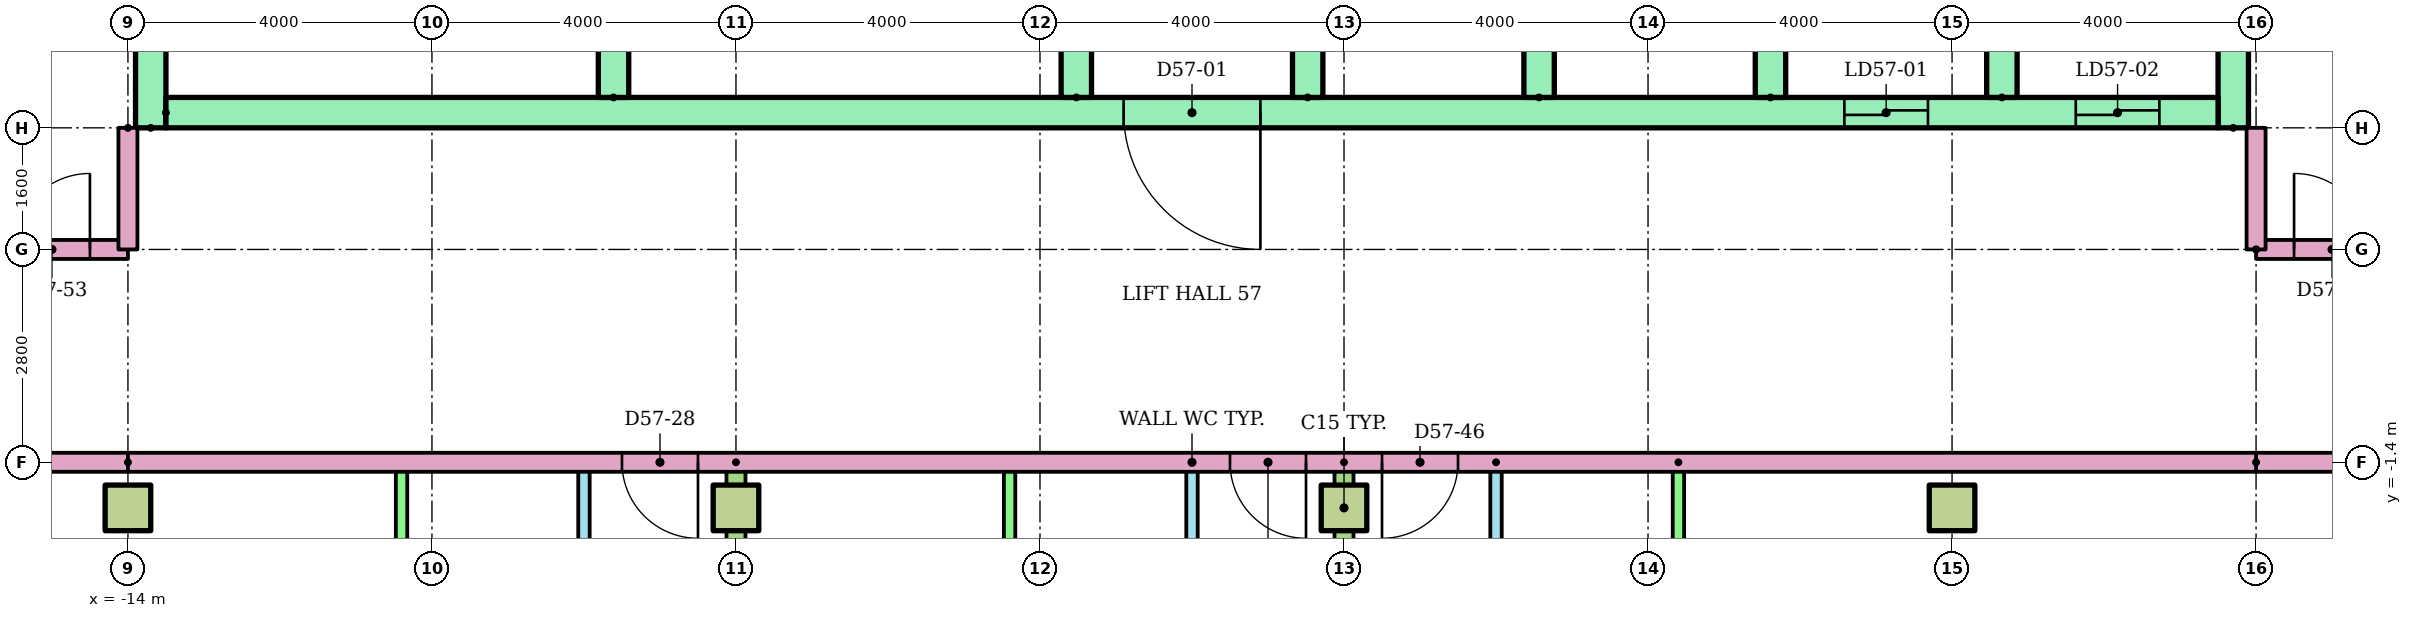
"""IFC4 building model, lengths in metres.
Left out: names, types, materials, properties, quantities, classifications, styles, units other than length and angle.
Written with IfcOpenShell. Run it as: python <this file> out.ifc"""

import sys

from ifc_helpers import new_model, si_unit, direction, frame, frame_2d, origin, origin_2d, place, context, subcontext, project, spatial, rectangle, extrude, element, fill, save


model = new_model("IFC4")
c1 = context("Model", 3, precision=1e-05, world=origin(), true_north=direction((0.0, 1.0)))
c2 = subcontext(c1, "Body", "Model", "MODEL_VIEW")
j1 = project(units=[si_unit("LENGTHUNIT", "METRE"), si_unit("PLANEANGLEUNIT", "RADIAN")], contexts=[c1])
p1 = place(None, origin())
s1 = spatial("IfcSite", under=j1, at=p1, CompositionType="ELEMENT")
p2 = place(p1, origin())
s2 = spatial("IfcBuilding", under=s1, at=p2, CompositionType="ELEMENT")
p3 = place(p2, frame((0.0, 0.0, 220.4)))
s3 = spatial("IfcBuildingStorey", under=s2, at=p3, CompositionType="ELEMENT", Elevation=220.4)
for number, where in (
    (1, (-14.0, -2.0, 0.0)),
    (2, (-6.0, -2.0, 0.0)),
    (3, (2.0, -2.0, 0.0)),
    (4, (10.0, -2.0, 0.0)),
):
    element("IfcColumn", number, at=place(p3, frame(where)), inside=s3, PredefinedType="COLUMN", context=c2, shape_type="SweptSolid", body=[
        extrude(rectangle(XDim=0.6, YDim=0.6, at=origin_2d()), origin(), (0.0, 0.0, 1.0), 3.2),
    ])
for number, where, z_axis, x_axis in (
    (5, (-13.7, 3.0, 0.0), (0.0, 0.0, 1.0), (0.0, 1.0, 0.0)),
    (6, (13.7, 3.0, 0.0), (0.0, 0.0, 1.0), (0.0, 1.0, 0.0)),
):
    element("IfcWall", number, at=place(p3, frame(where, z_axis=z_axis, x_axis=x_axis)), inside=s3, PredefinedType="SHEAR", context=c2, shape_type="SweptSolid", body=[
        extrude(rectangle(XDim=17.0, YDim=0.4, at=frame_2d((8.5, 0.0))), origin(), (0.0, 0.0, 1.0), 2.92),
    ])
p4 = place(p3, frame((-13.5, 3.2, 0.0)))
e7 = element("IfcWall", 7, at=p4, inside=s3, PredefinedType="SHEAR", context=c2, shape_type="SweptSolid", body=[
    extrude(rectangle(XDim=27.0, YDim=0.4, at=frame_2d((13.5, 0.0))), origin(), (0.0, 0.0, 1.0), 2.92),
])
p5 = place(p4, frame((22.083, 0.0, 0.0)))
e8 = element("IfcOpeningElement", 8, at=p5, cuts=e7, PredefinedType="OPENING", context=c2, shape_type="SweptSolid", body=[
    extrude(rectangle(XDim=1.1, YDim=2.1, at=frame_2d((0.55, 1.05))), frame((0.0, 0.21, 0.0), z_axis=(0.0, -1.0, 0.0), x_axis=(1.0, 0.0, 0.0)), (0.0, 0.0, 1.0), 0.42),
])
p6 = place(p4, frame((25.128, 0.0, 0.0)))
e9 = element("IfcOpeningElement", 9, at=p6, cuts=e7, PredefinedType="OPENING", context=c2, shape_type="SweptSolid", body=[
    extrude(rectangle(XDim=1.1, YDim=2.1, at=frame_2d((0.55, 1.05))), frame((0.0, 0.21, 0.0), z_axis=(0.0, -1.0, 0.0), x_axis=(1.0, 0.0, 0.0)), (0.0, 0.0, 1.0), 0.42),
])
p7 = place(p4, frame((12.6, 0.0, 0.0)))
e10 = element("IfcOpeningElement", 10, at=p7, cuts=e7, PredefinedType="OPENING", context=c2, shape_type="SweptSolid", body=[
    extrude(rectangle(XDim=1.8, YDim=2.1, at=frame_2d((0.9, 1.05))), frame((0.0, 0.21, 0.0), z_axis=(0.0, -1.0, 0.0), x_axis=(1.0, 0.0, 0.0)), (0.0, 0.0, 1.0), 0.42),
])
for number, where, z_axis, x_axis in (
    (11, (-7.611, 3.4, 0.0), (0.0, 0.0, 1.0), (0.0, 1.0, 0.0)),
    (12, (-1.522, 3.4, 0.0), (0.0, 0.0, 1.0), (0.0, 1.0, 0.0)),
    (13, (1.522, 3.4, 0.0), (0.0, 0.0, 1.0), (0.0, 1.0, 0.0)),
    (14, (4.567, 3.4, 0.0), (0.0, 0.0, 1.0), (0.0, 1.0, 0.0)),
    (15, (7.611, 3.4, 0.0), (0.0, 0.0, 1.0), (0.0, 1.0, 0.0)),
    (16, (10.656, 3.4, 0.0), (0.0, 0.0, 1.0), (0.0, 1.0, 0.0)),
):
    element("IfcWall", number, at=place(p3, frame(where, z_axis=z_axis, x_axis=x_axis)), inside=s3, PredefinedType="SHEAR", context=c2, shape_type="SweptSolid", body=[
        extrude(rectangle(XDim=3.0, YDim=0.4, at=frame_2d((1.5, 0.0))), origin(), (0.0, 0.0, 1.0), 2.92),
    ])
p8 = place(p3, frame((-8.0, -9.4, 0.0), z_axis=(0.0, 0.0, 1.0), x_axis=(0.0, 1.0, 0.0)))
e17 = element("IfcWall", 17, at=p8, inside=s3, PredefinedType="PARTITIONING", context=c2, shape_type="SweptSolid", body=[
    extrude(rectangle(XDim=8.0, YDim=0.15, at=frame_2d((4.0, 0.0))), origin(), (0.0, 0.0, 1.0), 2.4),
])
p9 = place(p8, frame((5.3, 0.0, 0.0)))
e18 = element("IfcOpeningElement", 18, at=p9, cuts=e17, PredefinedType="OPENING", context=c2, shape_type="SweptSolid", body=[
    extrude(rectangle(XDim=0.9, YDim=2.1, at=frame_2d((0.45, 1.05))), frame((0.0, 0.085, 0.0), z_axis=(0.0, -1.0, 0.0), x_axis=(1.0, 0.0, 0.0)), (0.0, 0.0, 1.0), 0.17),
])
p10 = place(p8, frame((1.35, 0.0, 0.0)))
e19 = element("IfcOpeningElement", 19, at=p10, cuts=e17, PredefinedType="OPENING", context=c2, shape_type="SweptSolid", body=[
    extrude(rectangle(XDim=0.8, YDim=2.1, at=frame_2d((0.4, 1.05))), frame((0.0, 0.085, 0.0), z_axis=(0.0, -1.0, 0.0), x_axis=(1.0, 0.0, 0.0)), (0.0, 0.0, 1.0), 0.17),
])
p11 = place(p3, frame((-10.4, -9.4, 0.0), z_axis=(0.0, 0.0, 1.0), x_axis=(0.0, 1.0, 0.0)))
e20 = element("IfcWall", 20, at=p11, inside=s3, PredefinedType="PARTITIONING", context=c2, shape_type="SweptSolid", body=[
    extrude(rectangle(XDim=8.0, YDim=0.15, at=frame_2d((4.0, 0.0))), origin(), (0.0, 0.0, 1.0), 2.4),
])
p12 = place(p3, frame((0.0, -9.4, 0.0), z_axis=(0.0, 0.0, 1.0), x_axis=(0.0, 1.0, 0.0)))
e21 = element("IfcWall", 21, at=p12, inside=s3, PredefinedType="PARTITIONING", context=c2, shape_type="SweptSolid", body=[
    extrude(rectangle(XDim=8.0, YDim=0.15, at=frame_2d((4.0, 0.0))), origin(), (0.0, 0.0, 1.0), 2.4),
])
p13 = place(p12, frame((5.3, 0.0, 0.0)))
e22 = element("IfcOpeningElement", 22, at=p13, cuts=e21, PredefinedType="OPENING", context=c2, shape_type="SweptSolid", body=[
    extrude(rectangle(XDim=0.9, YDim=2.1, at=frame_2d((0.45, 1.05))), frame((0.0, 0.085, 0.0), z_axis=(0.0, -1.0, 0.0), x_axis=(1.0, 0.0, 0.0)), (0.0, 0.0, 1.0), 0.17),
])
p14 = place(p12, frame((1.35, 0.0, 0.0)))
e23 = element("IfcOpeningElement", 23, at=p14, cuts=e21, PredefinedType="OPENING", context=c2, shape_type="SweptSolid", body=[
    extrude(rectangle(XDim=0.8, YDim=2.1, at=frame_2d((0.4, 1.05))), frame((0.0, 0.085, 0.0), z_axis=(0.0, -1.0, 0.0), x_axis=(1.0, 0.0, 0.0)), (0.0, 0.0, 1.0), 0.17),
])
p15 = place(p3, frame((-2.4, -9.4, 0.0), z_axis=(0.0, 0.0, 1.0), x_axis=(0.0, 1.0, 0.0)))
e24 = element("IfcWall", 24, at=p15, inside=s3, PredefinedType="PARTITIONING", context=c2, shape_type="SweptSolid", body=[
    extrude(rectangle(XDim=8.0, YDim=0.15, at=frame_2d((4.0, 0.0))), origin(), (0.0, 0.0, 1.0), 2.4),
])
p16 = place(p3, frame((-6.0, -1.4, 0.0), z_axis=(0.0, 0.0, 1.0), x_axis=(0.0, -1.0, 0.0)))
e25 = element("IfcWall", 25, at=p16, inside=s3, PredefinedType="PARTITIONING", context=c2, shape_type="SweptSolid", body=[
    extrude(rectangle(XDim=15.11, YDim=0.25, at=frame_2d((7.555, 0.0))), origin(), (0.0, 0.0, 1.0), 2.4),
])
p17 = place(p3, frame((4.0, -1.4, 0.0), z_axis=(0.0, 0.0, 1.0), x_axis=(0.0, -1.0, 0.0)))
e26 = element("IfcWall", 26, at=p17, inside=s3, PredefinedType="PARTITIONING", context=c2, shape_type="SweptSolid", body=[
    extrude(rectangle(XDim=8.0, YDim=0.15, at=frame_2d((4.0, 0.0))), origin(), (0.0, 0.0, 1.0), 2.4),
])
p18 = place(p17, frame((1.8, 0.0, 0.0)))
e27 = element("IfcOpeningElement", 27, at=p18, cuts=e26, PredefinedType="OPENING", context=c2, shape_type="SweptSolid", body=[
    extrude(rectangle(XDim=0.9, YDim=2.1, at=frame_2d((0.45, 1.05))), frame((0.0, 0.085, 0.0), z_axis=(0.0, -1.0, 0.0), x_axis=(1.0, 0.0, 0.0)), (0.0, 0.0, 1.0), 0.17),
])
p19 = place(p17, frame((5.85, 0.0, 0.0)))
e28 = element("IfcOpeningElement", 28, at=p19, cuts=e26, PredefinedType="OPENING", context=c2, shape_type="SweptSolid", body=[
    extrude(rectangle(XDim=0.8, YDim=2.1, at=frame_2d((0.4, 1.05))), frame((0.0, 0.085, 0.0), z_axis=(0.0, -1.0, 0.0), x_axis=(1.0, 0.0, 0.0)), (0.0, 0.0, 1.0), 0.17),
])
p20 = place(p3, frame((6.4, -1.4, 0.0), z_axis=(0.0, 0.0, 1.0), x_axis=(0.0, -1.0, 0.0)))
e29 = element("IfcWall", 29, at=p20, inside=s3, PredefinedType="PARTITIONING", context=c2, shape_type="SweptSolid", body=[
    extrude(rectangle(XDim=8.0, YDim=0.15, at=frame_2d((4.0, 0.0))), origin(), (0.0, 0.0, 1.0), 2.4),
])
p21 = place(p3, frame((2.0, -1.4, 0.0), z_axis=(0.0, 0.0, 1.0), x_axis=(0.0, -1.0, 0.0)))
e30 = element("IfcWall", 30, at=p21, inside=s3, PredefinedType="PARTITIONING", context=c2, shape_type="SweptSolid", body=[
    extrude(rectangle(XDim=15.11, YDim=0.25, at=frame_2d((7.555, 0.0))), origin(), (0.0, 0.0, 1.0), 2.4),
])
for number, where, z_axis, x_axis in (
    (31, (-14.0, -1.4, 0.0), (0.0, 0.0, 1.0), (-1.0, 0.0, 0.0)),
    (32, (28.92, -1.4, 0.0), (0.0, 0.0, 1.0), (-1.0, 0.0, 0.0)),
):
    element("IfcWall", number, at=place(p3, frame(where, z_axis=z_axis, x_axis=x_axis)), inside=s3, PredefinedType="PARTITIONING", context=c2, shape_type="SweptSolid", body=[
        extrude(rectangle(XDim=14.92, YDim=0.25, at=frame_2d((7.46, 0.0))), origin(), (0.0, 0.0, 1.0), 2.4),
    ])
p22 = place(p3, frame((-28.92, 1.4, 0.0)))
e33 = element("IfcWall", 33, at=p22, inside=s3, PredefinedType="PARTITIONING", context=c2, shape_type="SweptSolid", body=[
    extrude(rectangle(XDim=14.92, YDim=0.25, at=frame_2d((7.46, 0.0))), origin(), (0.0, 0.0, 1.0), 2.4),
])
p23 = place(p22, frame((13.42, 0.0, 0.0)))
e34 = element("IfcOpeningElement", 34, at=p23, cuts=e33, PredefinedType="OPENING", context=c2, shape_type="SweptSolid", body=[
    extrude(rectangle(XDim=1.0, YDim=2.1, at=frame_2d((0.5, 1.05))), frame((0.0, 0.135, 0.0), z_axis=(0.0, -1.0, 0.0), x_axis=(1.0, 0.0, 0.0)), (0.0, 0.0, 1.0), 0.27),
])
p24 = place(p3, frame((14.0, 1.4, 0.0)))
e35 = element("IfcWall", 35, at=p24, inside=s3, PredefinedType="PARTITIONING", context=c2, shape_type="SweptSolid", body=[
    extrude(rectangle(XDim=14.92, YDim=0.25, at=frame_2d((7.46, 0.0))), origin(), (0.0, 0.0, 1.0), 2.4),
])
p25 = place(p24, frame((0.5, 0.0, 0.0)))
e36 = element("IfcOpeningElement", 36, at=p25, cuts=e35, PredefinedType="OPENING", context=c2, shape_type="SweptSolid", body=[
    extrude(rectangle(XDim=1.0, YDim=2.1, at=frame_2d((0.5, 1.05))), frame((0.0, 0.135, 0.0), z_axis=(0.0, -1.0, 0.0), x_axis=(1.0, 0.0, 0.0)), (0.0, 0.0, 1.0), 0.27),
])
p26 = place(p3, frame((14.0, -1.4, 0.0), z_axis=(0.0, 0.0, 1.0), x_axis=(-1.0, 0.0, 0.0)))
e37 = element("IfcWall", 37, at=p26, inside=s3, PredefinedType="PARTITIONING", context=c2, shape_type="SweptSolid", body=[
    extrude(rectangle(XDim=28.0, YDim=0.25, at=frame_2d((14.0, 0.0))), origin(), (0.0, 0.0, 1.0), 2.4),
])
p27 = place(p26, frame((20.5, 0.0, 0.0)))
e38 = element("IfcOpeningElement", 38, at=p27, cuts=e37, PredefinedType="OPENING", context=c2, shape_type="SweptSolid", body=[
    extrude(rectangle(XDim=1.0, YDim=2.1, at=frame_2d((0.5, 1.05))), frame((0.0, 0.135, 0.0), z_axis=(0.0, -1.0, 0.0), x_axis=(1.0, 0.0, 0.0)), (0.0, 0.0, 1.0), 0.27),
])
p28 = place(p26, frame((12.5, 0.0, 0.0)))
e39 = element("IfcOpeningElement", 39, at=p28, cuts=e37, PredefinedType="OPENING", context=c2, shape_type="SweptSolid", body=[
    extrude(rectangle(XDim=1.0, YDim=2.1, at=frame_2d((0.5, 1.05))), frame((0.0, 0.135, 0.0), z_axis=(0.0, -1.0, 0.0), x_axis=(1.0, 0.0, 0.0)), (0.0, 0.0, 1.0), 0.27),
])
p29 = place(p26, frame((10.5, 0.0, 0.0)))
e40 = element("IfcOpeningElement", 40, at=p29, cuts=e37, PredefinedType="OPENING", context=c2, shape_type="SweptSolid", body=[
    extrude(rectangle(XDim=1.0, YDim=2.1, at=frame_2d((0.5, 1.05))), frame((0.0, 0.135, 0.0), z_axis=(0.0, -1.0, 0.0), x_axis=(1.0, 0.0, 0.0)), (0.0, 0.0, 1.0), 0.27),
])
for number, where, z_axis, x_axis in (
    (41, (-14.0, 3.0, 0.0), (0.0, 0.0, 1.0), (0.0, -1.0, 0.0)),
    (42, (14.0, 1.4, 0.0), (0.0, 0.0, 1.0), (0.0, 1.0, 0.0)),
):
    element("IfcWall", number, at=place(p3, frame(where, z_axis=z_axis, x_axis=x_axis)), inside=s3, PredefinedType="PARTITIONING", context=c2, shape_type="SweptSolid", body=[
        extrude(rectangle(XDim=1.6, YDim=0.25, at=frame_2d((0.8, 0.0))), origin(), (0.0, 0.0, 1.0), 2.4),
    ])
p30 = place(p5, origin())
e43 = element("IfcDoor", 43, at=p30, inside=s3, OperationType="SLIDING_TO_LEFT", PredefinedType="DOOR", context=c2, shape_type="SweptSolid", body=[
    extrude(rectangle(XDim=1.1, YDim=2.1, at=frame_2d((0.55, 1.05))), frame((0.0, 0.025, 0.0), z_axis=(0.0, -1.0, 0.0), x_axis=(1.0, 0.0, 0.0)), (0.0, 0.0, 1.0), 0.05),
])
fill(e8, e43)
p31 = place(p6, origin())
e44 = element("IfcDoor", 44, at=p31, inside=s3, OperationType="SLIDING_TO_LEFT", PredefinedType="DOOR", context=c2, shape_type="SweptSolid", body=[
    extrude(rectangle(XDim=1.1, YDim=2.1, at=frame_2d((0.55, 1.05))), frame((0.0, 0.025, 0.0), z_axis=(0.0, -1.0, 0.0), x_axis=(1.0, 0.0, 0.0)), (0.0, 0.0, 1.0), 0.05),
])
fill(e9, e44)
p32 = place(p7, frame((1.8, 0.0, 0.0), z_axis=(0.0, 0.0, 1.0), x_axis=(-1.0, 0.0, 0.0)))
e45 = element("IfcDoor", 45, at=p32, inside=s3, OperationType="DOUBLE_DOOR_SINGLE_SWING", PredefinedType="DOOR", context=c2, shape_type="SweptSolid", body=[
    extrude(rectangle(XDim=1.8, YDim=2.1, at=frame_2d((0.9, 1.05))), frame((0.0, 0.025, 0.0), z_axis=(0.0, -1.0, 0.0), x_axis=(1.0, 0.0, 0.0)), (0.0, 0.0, 1.0), 0.05),
])
fill(e10, e45)
p33 = place(p27, origin())
e46 = element("IfcDoor", 46, at=p33, inside=s3, OperationType="SINGLE_SWING_LEFT", PredefinedType="DOOR", context=c2, shape_type="SweptSolid", body=[
    extrude(rectangle(XDim=1.0, YDim=2.1, at=frame_2d((0.5, 1.05))), frame((0.0, 0.025, 0.0), z_axis=(0.0, -1.0, 0.0), x_axis=(1.0, 0.0, 0.0)), (0.0, 0.0, 1.0), 0.05),
])
fill(e38, e46)
p34 = place(p28, origin())
e47 = element("IfcDoor", 47, at=p34, inside=s3, OperationType="SINGLE_SWING_LEFT", PredefinedType="DOOR", context=c2, shape_type="SweptSolid", body=[
    extrude(rectangle(XDim=1.0, YDim=2.1, at=frame_2d((0.5, 1.05))), frame((0.0, 0.025, 0.0), z_axis=(0.0, -1.0, 0.0), x_axis=(1.0, 0.0, 0.0)), (0.0, 0.0, 1.0), 0.05),
])
fill(e39, e47)
p35 = place(p29, origin())
e48 = element("IfcDoor", 48, at=p35, inside=s3, OperationType="SINGLE_SWING_RIGHT", PredefinedType="DOOR", context=c2, shape_type="SweptSolid", body=[
    extrude(rectangle(XDim=1.0, YDim=2.1, at=frame_2d((0.5, 1.05))), frame((0.0, 0.025, 0.0), z_axis=(0.0, -1.0, 0.0), x_axis=(1.0, 0.0, 0.0)), (0.0, 0.0, 1.0), 0.05),
])
fill(e40, e48)
p36 = place(p23, origin())
e49 = element("IfcDoor", 49, at=p36, inside=s3, OperationType="SINGLE_SWING_RIGHT", PredefinedType="DOOR", context=c2, shape_type="SweptSolid", body=[
    extrude(rectangle(XDim=1.0, YDim=2.1, at=frame_2d((0.5, 1.05))), frame((0.0, 0.025, 0.0), z_axis=(0.0, -1.0, 0.0), x_axis=(1.0, 0.0, 0.0)), (0.0, 0.0, 1.0), 0.05),
])
fill(e34, e49)
p37 = place(p25, origin())
e50 = element("IfcDoor", 50, at=p37, inside=s3, OperationType="SINGLE_SWING_LEFT", PredefinedType="DOOR", context=c2, shape_type="SweptSolid", body=[
    extrude(rectangle(XDim=1.0, YDim=2.1, at=frame_2d((0.5, 1.05))), frame((0.0, 0.025, 0.0), z_axis=(0.0, -1.0, 0.0), x_axis=(1.0, 0.0, 0.0)), (0.0, 0.0, 1.0), 0.05),
])
fill(e36, e50)
save(model, sys.argv[1])
